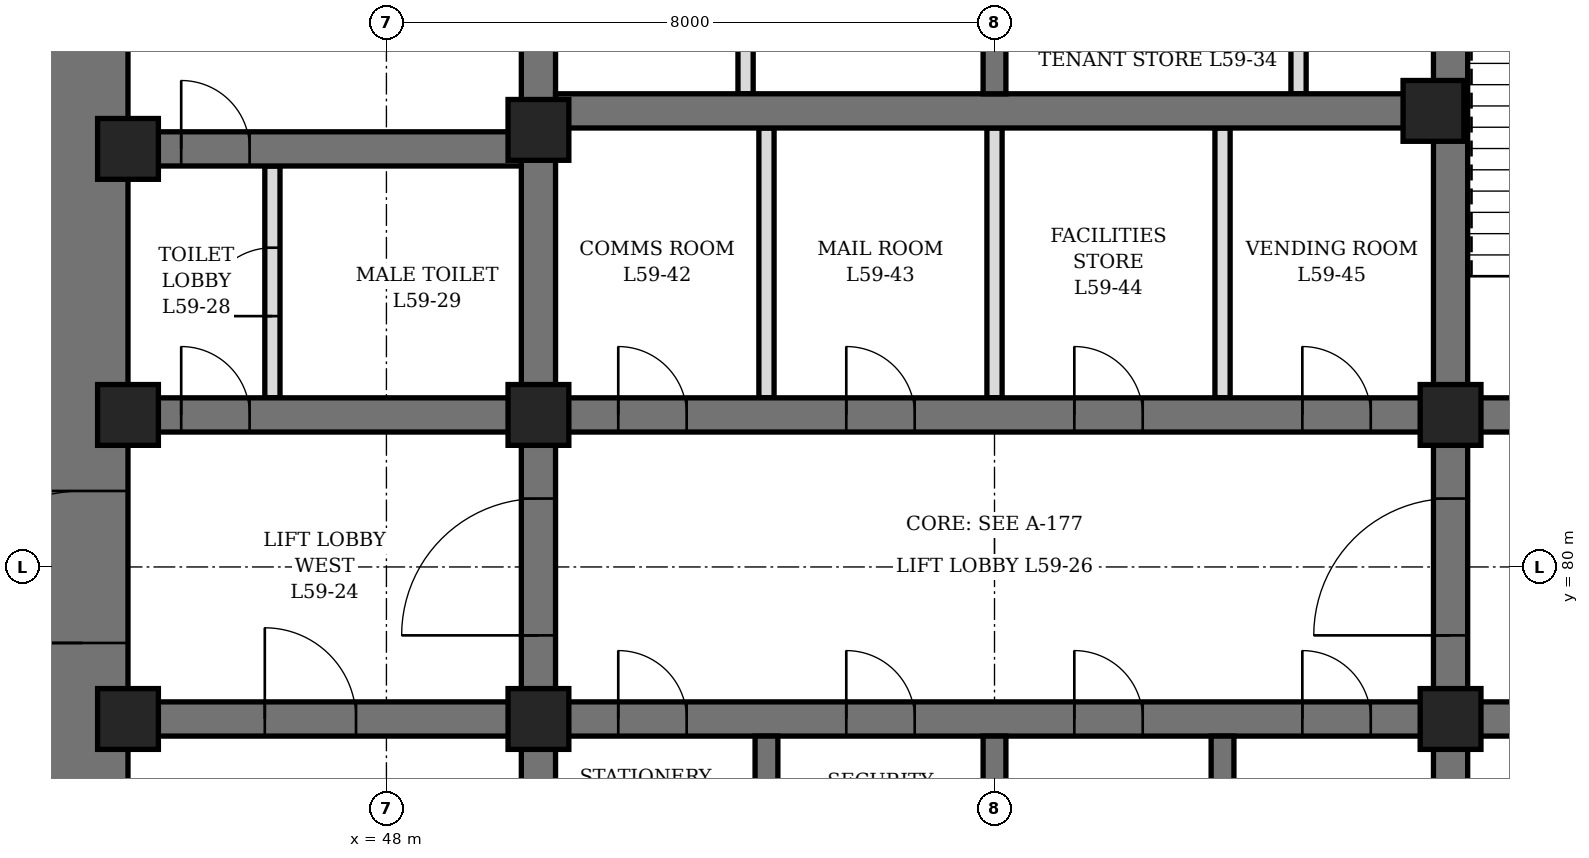
"""IFC4 building model, lengths in metres.
Left out: names, types, materials, properties, quantities, classifications, styles, units other than length and angle.
Written with IfcOpenShell. Run it as: python <this file> out.ifc"""

import sys

from ifc_helpers import new_model, si_unit, direction, frame, frame_2d, origin, origin_2d, place, context, subcontext, project, spatial, rectangle, hollow_rectangle, extrude, element, fill, save


model = new_model("IFC4")
c1 = context("Model", 3, precision=1e-05, world=origin(), true_north=direction((0.0, 1.0)))
c2 = subcontext(c1, "Body", "Model", "MODEL_VIEW")
j1 = project(units=[si_unit("LENGTHUNIT", "METRE"), si_unit("PLANEANGLEUNIT", "RADIAN")], contexts=[c1])
p1 = place(None, origin())
s1 = spatial("IfcSite", under=j1, at=p1, CompositionType="ELEMENT")
p2 = place(p1, origin())
s2 = spatial("IfcBuilding", under=s1, at=p2, CompositionType="ELEMENT")
p3 = place(p2, frame((0.0, 0.0, 262.9)))
s3 = spatial("IfcBuildingStorey", under=s2, at=p3, CompositionType="ELEMENT", Elevation=262.9)
p4 = place(p3, frame((44.0, 70.4, 0.0), z_axis=(0.0, 0.0, 1.0), x_axis=(0.0, 1.0, 0.0)))
e1 = element("IfcWall", 1, at=p4, inside=s3, PredefinedType="SHEAR", context=c2, shape_type="SweptSolid", body=[
    extrude(rectangle(XDim=19.2, YDim=1.2, at=frame_2d((9.6, 0.0))), origin(), (0.0, 0.0, 1.0), 4.2),
])
p5 = place(p4, frame((8.6, 0.0, 0.0)))
e2 = element("IfcOpeningElement", 2, at=p5, cuts=e1, PredefinedType="OPENING", context=c2, shape_type="SweptSolid", body=[
    extrude(rectangle(XDim=2.0, YDim=2.4, at=frame_2d((1.0, 1.2))), frame((0.0, 0.61, 0.0), z_axis=(0.0, -1.0, 0.0), x_axis=(1.0, 0.0, 0.0)), (0.0, 0.0, 1.0), 1.22),
])
p6 = place(p3, frame((50.0, 71.6, 0.0), z_axis=(0.0, 0.0, 1.0), x_axis=(0.0, 1.0, 0.0)))
e3 = element("IfcWall", 3, at=p6, inside=s3, PredefinedType="SHEAR", context=c2, shape_type="SweptSolid", body=[
    extrude(rectangle(XDim=16.8, YDim=0.45, at=frame_2d((8.4, 0.0))), origin(), (0.0, 0.0, 1.0), 4.2),
])
p7 = place(p6, frame((7.5, 0.0, 0.0)))
e4 = element("IfcOpeningElement", 4, at=p7, cuts=e3, PredefinedType="OPENING", context=c2, shape_type="SweptSolid", body=[
    extrude(rectangle(XDim=1.8, YDim=2.4, at=frame_2d((0.9, 1.2))), frame((0.0, 0.235, 0.0), z_axis=(0.0, -1.0, 0.0), x_axis=(1.0, 0.0, 0.0)), (0.0, 0.0, 1.0), 0.47),
])
p8 = place(p3, frame((62.0, 71.6, 0.0), z_axis=(0.0, 0.0, 1.0), x_axis=(0.0, 1.0, 0.0)))
e5 = element("IfcWall", 5, at=p8, inside=s3, PredefinedType="SHEAR", context=c2, shape_type="SweptSolid", body=[
    extrude(rectangle(XDim=16.8, YDim=0.45, at=frame_2d((8.4, 0.0))), origin(), (0.0, 0.0, 1.0), 4.2),
])
p9 = place(p8, frame((7.5, 0.0, 0.0)))
e6 = element("IfcOpeningElement", 6, at=p9, cuts=e5, PredefinedType="OPENING", context=c2, shape_type="SweptSolid", body=[
    extrude(rectangle(XDim=1.8, YDim=2.4, at=frame_2d((0.9, 1.2))), frame((0.0, 0.235, 0.0), z_axis=(0.0, -1.0, 0.0), x_axis=(1.0, 0.0, 0.0)), (0.0, 0.0, 1.0), 0.47),
])
p10 = place(p3, frame((44.6, 78.0, 0.0), z_axis=(0.0, 0.0, 1.0), x_axis=(1.0, 0.0, 0.0)))
e7 = element("IfcWall", 7, at=p10, inside=s3, PredefinedType="SHEAR", context=c2, shape_type="SweptSolid", body=[
    extrude(rectangle(XDim=5.175, YDim=0.45, at=frame_2d((2.587, 0.0))), origin(), (0.0, 0.0, 1.0), 4.2),
])
p11 = place(p10, frame((1.8, 0.0, 0.0)))
e8 = element("IfcOpeningElement", 8, at=p11, cuts=e7, PredefinedType="OPENING", context=c2, shape_type="SweptSolid", body=[
    extrude(rectangle(XDim=1.2, YDim=2.1, at=frame_2d((0.6, 1.05))), frame((0.0, 0.235, 0.0), z_axis=(0.0, -1.0, 0.0), x_axis=(1.0, 0.0, 0.0)), (0.0, 0.0, 1.0), 0.47),
])
p12 = place(p3, frame((44.6, 82.0, 0.0), z_axis=(0.0, 0.0, 1.0), x_axis=(1.0, 0.0, 0.0)))
e9 = element("IfcWall", 9, at=p12, inside=s3, PredefinedType="SHEAR", context=c2, shape_type="SweptSolid", body=[
    extrude(rectangle(XDim=5.175, YDim=0.45, at=frame_2d((2.587, 0.0))), origin(), (0.0, 0.0, 1.0), 4.2),
])
p13 = place(p12, frame((0.7, 0.0, 0.0)))
e10 = element("IfcOpeningElement", 10, at=p13, cuts=e9, PredefinedType="OPENING", context=c2, shape_type="SweptSolid", body=[
    extrude(rectangle(XDim=0.9, YDim=2.1, at=frame_2d((0.45, 1.05))), frame((0.0, 0.235, 0.0), z_axis=(0.0, -1.0, 0.0), x_axis=(1.0, 0.0, 0.0)), (0.0, 0.0, 1.0), 0.47),
])
p14 = place(p3, frame((44.6, 85.5, 0.0), z_axis=(0.0, 0.0, 1.0), x_axis=(1.0, 0.0, 0.0)))
e11 = element("IfcWall", 11, at=p14, inside=s3, PredefinedType="SHEAR", context=c2, shape_type="SweptSolid", body=[
    extrude(rectangle(XDim=5.175, YDim=0.45, at=frame_2d((2.587, 0.0))), origin(), (0.0, 0.0, 1.0), 4.2),
])
p15 = place(p14, frame((0.7, 0.0, 0.0)))
e12 = element("IfcOpeningElement", 12, at=p15, cuts=e11, PredefinedType="OPENING", context=c2, shape_type="SweptSolid", body=[
    extrude(rectangle(XDim=0.9, YDim=2.1, at=frame_2d((0.45, 1.05))), frame((0.0, 0.235, 0.0), z_axis=(0.0, -1.0, 0.0), x_axis=(1.0, 0.0, 0.0)), (0.0, 0.0, 1.0), 0.47),
])
p16 = place(p3, frame((62.225, 78.0, 0.0), z_axis=(0.0, 0.0, 1.0), x_axis=(1.0, 0.0, 0.0)))
e13 = element("IfcWall", 13, at=p16, inside=s3, PredefinedType="SHEAR", context=c2, shape_type="SweptSolid", body=[
    extrude(rectangle(XDim=5.175, YDim=0.45, at=frame_2d((2.587, 0.0))), origin(), (0.0, 0.0, 1.0), 4.2),
])
p17 = place(p16, frame((2.175, 0.0, 0.0)))
e14 = element("IfcOpeningElement", 14, at=p17, cuts=e13, PredefinedType="OPENING", context=c2, shape_type="SweptSolid", body=[
    extrude(rectangle(XDim=1.2, YDim=2.1, at=frame_2d((0.6, 1.05))), frame((0.0, 0.235, 0.0), z_axis=(0.0, -1.0, 0.0), x_axis=(1.0, 0.0, 0.0)), (0.0, 0.0, 1.0), 0.47),
])
p18 = place(p3, frame((62.225, 82.0, 0.0), z_axis=(0.0, 0.0, 1.0), x_axis=(1.0, 0.0, 0.0)))
e15 = element("IfcWall", 15, at=p18, inside=s3, PredefinedType="SHEAR", context=c2, shape_type="SweptSolid", body=[
    extrude(rectangle(XDim=5.175, YDim=0.45, at=frame_2d((2.587, 0.0))), origin(), (0.0, 0.0, 1.0), 4.2),
])
p19 = place(p18, frame((2.175, 0.0, 0.0)))
e16 = element("IfcOpeningElement", 16, at=p19, cuts=e15, PredefinedType="OPENING", context=c2, shape_type="SweptSolid", body=[
    extrude(rectangle(XDim=1.2, YDim=2.1, at=frame_2d((0.6, 1.05))), frame((0.0, 0.235, 0.0), z_axis=(0.0, -1.0, 0.0), x_axis=(1.0, 0.0, 0.0)), (0.0, 0.0, 1.0), 0.47),
])
p20 = place(p3, frame((50.225, 78.0, 0.0), z_axis=(0.0, 0.0, 1.0), x_axis=(1.0, 0.0, 0.0)))
e17 = element("IfcWall", 17, at=p20, inside=s3, PredefinedType="SHEAR", context=c2, shape_type="SweptSolid", body=[
    extrude(rectangle(XDim=11.55, YDim=0.45, at=frame_2d((5.775, 0.0))), origin(), (0.0, 0.0, 1.0), 4.2),
])
p21 = place(p20, frame((0.825, 0.0, 0.0)))
e18 = element("IfcOpeningElement", 18, at=p21, cuts=e17, PredefinedType="OPENING", context=c2, shape_type="SweptSolid", body=[
    extrude(rectangle(XDim=0.9, YDim=2.1, at=frame_2d((0.45, 1.05))), frame((0.0, 0.235, 0.0), z_axis=(0.0, -1.0, 0.0), x_axis=(1.0, 0.0, 0.0)), (0.0, 0.0, 1.0), 0.47),
])
p22 = place(p20, frame((3.825, 0.0, 0.0)))
e19 = element("IfcOpeningElement", 19, at=p22, cuts=e17, PredefinedType="OPENING", context=c2, shape_type="SweptSolid", body=[
    extrude(rectangle(XDim=0.9, YDim=2.1, at=frame_2d((0.45, 1.05))), frame((0.0, 0.235, 0.0), z_axis=(0.0, -1.0, 0.0), x_axis=(1.0, 0.0, 0.0)), (0.0, 0.0, 1.0), 0.47),
])
p23 = place(p20, frame((6.825, 0.0, 0.0)))
e20 = element("IfcOpeningElement", 20, at=p23, cuts=e17, PredefinedType="OPENING", context=c2, shape_type="SweptSolid", body=[
    extrude(rectangle(XDim=0.9, YDim=2.1, at=frame_2d((0.45, 1.05))), frame((0.0, 0.235, 0.0), z_axis=(0.0, -1.0, 0.0), x_axis=(1.0, 0.0, 0.0)), (0.0, 0.0, 1.0), 0.47),
])
p24 = place(p20, frame((9.825, 0.0, 0.0)))
e21 = element("IfcOpeningElement", 21, at=p24, cuts=e17, PredefinedType="OPENING", context=c2, shape_type="SweptSolid", body=[
    extrude(rectangle(XDim=0.9, YDim=2.1, at=frame_2d((0.45, 1.05))), frame((0.0, 0.235, 0.0), z_axis=(0.0, -1.0, 0.0), x_axis=(1.0, 0.0, 0.0)), (0.0, 0.0, 1.0), 0.47),
])
p25 = place(p3, frame((50.225, 82.0, 0.0), z_axis=(0.0, 0.0, 1.0), x_axis=(1.0, 0.0, 0.0)))
e22 = element("IfcWall", 22, at=p25, inside=s3, PredefinedType="SHEAR", context=c2, shape_type="SweptSolid", body=[
    extrude(rectangle(XDim=11.55, YDim=0.45, at=frame_2d((5.775, 0.0))), origin(), (0.0, 0.0, 1.0), 4.2),
])
p26 = place(p25, frame((0.825, 0.0, 0.0)))
e23 = element("IfcOpeningElement", 23, at=p26, cuts=e22, PredefinedType="OPENING", context=c2, shape_type="SweptSolid", body=[
    extrude(rectangle(XDim=0.9, YDim=2.1, at=frame_2d((0.45, 1.05))), frame((0.0, 0.235, 0.0), z_axis=(0.0, -1.0, 0.0), x_axis=(1.0, 0.0, 0.0)), (0.0, 0.0, 1.0), 0.47),
])
p27 = place(p25, frame((3.825, 0.0, 0.0)))
e24 = element("IfcOpeningElement", 24, at=p27, cuts=e22, PredefinedType="OPENING", context=c2, shape_type="SweptSolid", body=[
    extrude(rectangle(XDim=0.9, YDim=2.1, at=frame_2d((0.45, 1.05))), frame((0.0, 0.235, 0.0), z_axis=(0.0, -1.0, 0.0), x_axis=(1.0, 0.0, 0.0)), (0.0, 0.0, 1.0), 0.47),
])
p28 = place(p25, frame((6.825, 0.0, 0.0)))
e25 = element("IfcOpeningElement", 25, at=p28, cuts=e22, PredefinedType="OPENING", context=c2, shape_type="SweptSolid", body=[
    extrude(rectangle(XDim=0.9, YDim=2.1, at=frame_2d((0.45, 1.05))), frame((0.0, 0.235, 0.0), z_axis=(0.0, -1.0, 0.0), x_axis=(1.0, 0.0, 0.0)), (0.0, 0.0, 1.0), 0.47),
])
p29 = place(p25, frame((9.825, 0.0, 0.0)))
e26 = element("IfcOpeningElement", 26, at=p29, cuts=e22, PredefinedType="OPENING", context=c2, shape_type="SweptSolid", body=[
    extrude(rectangle(XDim=0.9, YDim=2.1, at=frame_2d((0.45, 1.05))), frame((0.0, 0.235, 0.0), z_axis=(0.0, -1.0, 0.0), x_axis=(1.0, 0.0, 0.0)), (0.0, 0.0, 1.0), 0.47),
])
p30 = place(p3, frame((50.225, 86.0, 0.0), z_axis=(0.0, 0.0, 1.0), x_axis=(1.0, 0.0, 0.0)))
e27 = element("IfcWall", 27, at=p30, inside=s3, PredefinedType="SHEAR", context=c2, shape_type="SweptSolid", body=[
    extrude(rectangle(XDim=11.55, YDim=0.45, at=frame_2d((5.775, 0.0))), origin(), (0.0, 0.0, 1.0), 4.2),
])
for number, where, z_axis, x_axis in (
    (28, (53.0, 74.15, 0.0), (0.0, 0.0, 1.0), (0.0, 1.0, 0.0)),
    (29, (56.0, 74.15, 0.0), (0.0, 0.0, 1.0), (0.0, 1.0, 0.0)),
    (30, (59.0, 74.15, 0.0), (0.0, 0.0, 1.0), (0.0, 1.0, 0.0)),
):
    element("IfcWall", number, at=place(p3, frame(where, z_axis=z_axis, x_axis=x_axis)), inside=s3, PredefinedType="SHEAR", context=c2, shape_type="SweptSolid", body=[
        extrude(rectangle(XDim=3.625, YDim=0.3, at=frame_2d((1.812, 0.0))), origin(), (0.0, 0.0, 1.0), 4.2),
    ])
p31 = place(p3, frame((56.0, 86.225, 0.0), z_axis=(0.0, 0.0, 1.0), x_axis=(0.0, 1.0, 0.0)))
e31 = element("IfcWall", 31, at=p31, inside=s3, PredefinedType="SHEAR", context=c2, shape_type="SweptSolid", body=[
    extrude(rectangle(XDim=2.175, YDim=0.3, at=frame_2d((1.087, 0.0))), origin(), (0.0, 0.0, 1.0), 4.2),
])
for number, where, z_axis, x_axis in (
    (32, (44.6, 78.0, 0.0), (0.0, 0.0, 1.0), (1.0, 0.0, 0.0)),
    (33, (44.6, 82.0, 0.0), (0.0, 0.0, 1.0), (1.0, 0.0, 0.0)),
    (34, (44.6, 85.5, 0.0), (0.0, 0.0, 1.0), (1.0, 0.0, 0.0)),
    (35, (50.0, 78.0, 0.0), (0.0, 0.0, 1.0), (1.0, 0.0, 0.0)),
    (36, (50.0, 82.0, 0.0), (0.0, 0.0, 1.0), (1.0, 0.0, 0.0)),
    (37, (50.0, 85.75, 0.0), (0.0, 0.0, 1.0), (1.0, 0.0, 0.0)),
    (38, (61.775, 86.0, 0.0), (0.0, 0.0, 1.0), (1.0, 0.0, 0.0)),
    (39, (62.0, 78.0, 0.0), (0.0, 0.0, 1.0), (1.0, 0.0, 0.0)),
    (40, (62.0, 82.0, 0.0), (0.0, 0.0, 1.0), (1.0, 0.0, 0.0)),
):
    element("IfcColumn", number, at=place(p3, frame(where, z_axis=z_axis, x_axis=x_axis)), inside=s3, PredefinedType="COLUMN", context=c2, shape_type="SweptSolid", body=[
        extrude(hollow_rectangle(XDim=0.8, YDim=0.8, WallThickness=0.1, at=origin_2d()), origin(), (0.0, 0.0, 1.0), 4.2),
    ])
p32 = place(p3, frame((46.5, 82.225, 0.0), z_axis=(0.0, 0.0, 1.0), x_axis=(0.0, 1.0, 0.0)))
e41 = element("IfcWall", 41, at=p32, inside=s3, PredefinedType="PARTITIONING", context=c2, shape_type="SweptSolid", body=[
    extrude(rectangle(XDim=3.05, YDim=0.2, at=frame_2d((1.525, 0.0))), origin(), (0.0, 0.0, 1.0), 4.04),
])
p33 = place(p32, frame((1.075, 0.0, 0.0)))
e42 = element("IfcOpeningElement", 42, at=p33, cuts=e41, PredefinedType="OPENING", context=c2, shape_type="SweptSolid", body=[
    extrude(rectangle(XDim=0.9, YDim=2.1, at=frame_2d((0.45, 1.05))), frame((0.0, 0.11, 0.0), z_axis=(0.0, -1.0, 0.0), x_axis=(1.0, 0.0, 0.0)), (0.0, 0.0, 1.0), 0.22),
])
p34 = place(p3, frame((52.725, 86.225, 0.0), z_axis=(0.0, 0.0, 1.0), x_axis=(0.0, 1.0, 0.0)))
e43 = element("IfcWall", 43, at=p34, inside=s3, PredefinedType="PARTITIONING", context=c2, shape_type="SweptSolid", body=[
    extrude(rectangle(XDim=2.175, YDim=0.2, at=frame_2d((1.087, 0.0))), origin(), (0.0, 0.0, 1.0), 4.04),
])
p35 = place(p3, frame((60.0, 86.225, 0.0), z_axis=(0.0, 0.0, 1.0), x_axis=(0.0, 1.0, 0.0)))
e44 = element("IfcWall", 44, at=p35, inside=s3, PredefinedType="PARTITIONING", context=c2, shape_type="SweptSolid", body=[
    extrude(rectangle(XDim=2.175, YDim=0.2, at=frame_2d((1.087, 0.0))), origin(), (0.0, 0.0, 1.0), 4.04),
])
p36 = place(p35, frame((0.637, 0.0, 0.0)))
e45 = element("IfcOpeningElement", 45, at=p36, cuts=e44, PredefinedType="OPENING", context=c2, shape_type="SweptSolid", body=[
    extrude(rectangle(XDim=0.9, YDim=2.1, at=frame_2d((0.45, 1.05))), frame((0.0, 0.11, 0.0), z_axis=(0.0, -1.0, 0.0), x_axis=(1.0, 0.0, 0.0)), (0.0, 0.0, 1.0), 0.22),
])
p37 = place(p3, frame((53.0, 82.225, 0.0), z_axis=(0.0, 0.0, 1.0), x_axis=(0.0, 1.0, 0.0)))
e46 = element("IfcWall", 46, at=p37, inside=s3, PredefinedType="PARTITIONING", context=c2, shape_type="SweptSolid", body=[
    extrude(rectangle(XDim=3.55, YDim=0.2, at=frame_2d((1.775, 0.0))), origin(), (0.0, 0.0, 1.0), 4.04),
])
p38 = place(p3, frame((56.0, 82.225, 0.0), z_axis=(0.0, 0.0, 1.0), x_axis=(0.0, 1.0, 0.0)))
e47 = element("IfcWall", 47, at=p38, inside=s3, PredefinedType="PARTITIONING", context=c2, shape_type="SweptSolid", body=[
    extrude(rectangle(XDim=3.55, YDim=0.2, at=frame_2d((1.775, 0.0))), origin(), (0.0, 0.0, 1.0), 3.14),
])
p39 = place(p3, frame((59.0, 82.225, 0.0), z_axis=(0.0, 0.0, 1.0), x_axis=(0.0, 1.0, 0.0)))
e48 = element("IfcWall", 48, at=p39, inside=s3, PredefinedType="PARTITIONING", context=c2, shape_type="SweptSolid", body=[
    extrude(rectangle(XDim=3.55, YDim=0.2, at=frame_2d((1.775, 0.0))), origin(), (0.0, 0.0, 1.0), 4.04),
])
p40 = place(p13, origin())
e49 = element("IfcDoor", 49, at=p40, inside=s3, OperationType="SINGLE_SWING_LEFT", PredefinedType="DOOR", context=c2, shape_type="SweptSolid", body=[
    extrude(rectangle(XDim=0.9, YDim=2.1, at=frame_2d((0.45, 1.05))), frame((0.0, 0.225, 0.0), z_axis=(0.0, -1.0, 0.0), x_axis=(1.0, 0.0, 0.0)), (0.0, 0.0, 1.0), 0.449),
])
fill(e10, e49)
p41 = place(p33, origin())
e50 = element("IfcDoor", 50, at=p41, inside=s3, OperationType="SINGLE_SWING_RIGHT", PredefinedType="DOOR", context=c2, shape_type="SweptSolid", body=[
    extrude(rectangle(XDim=0.9, YDim=2.1, at=frame_2d((0.45, 1.05))), frame((0.0, 0.1, 0.0), z_axis=(0.0, -1.0, 0.0), x_axis=(1.0, 0.0, 0.0)), (0.0, 0.0, 1.0), 0.199),
])
fill(e42, e50)
p42 = place(p15, origin())
e51 = element("IfcDoor", 51, at=p42, inside=s3, OperationType="SINGLE_SWING_RIGHT", PredefinedType="DOOR", context=c2, shape_type="SweptSolid", body=[
    extrude(rectangle(XDim=0.9, YDim=2.1, at=frame_2d((0.45, 1.05))), frame((0.0, 0.225, 0.0), z_axis=(0.0, -1.0, 0.0), x_axis=(1.0, 0.0, 0.0)), (0.0, 0.0, 1.0), 0.449),
])
fill(e12, e51)
p43 = place(p21, origin())
e52 = element("IfcDoor", 52, at=p43, inside=s3, OperationType="SINGLE_SWING_LEFT", PredefinedType="DOOR", context=c2, shape_type="SweptSolid", body=[
    extrude(rectangle(XDim=0.9, YDim=2.1, at=frame_2d((0.45, 1.05))), frame((0.0, 0.225, 0.0), z_axis=(0.0, -1.0, 0.0), x_axis=(1.0, 0.0, 0.0)), (0.0, 0.0, 1.0), 0.449),
])
fill(e18, e52)
p44 = place(p22, origin())
e53 = element("IfcDoor", 53, at=p44, inside=s3, OperationType="SINGLE_SWING_LEFT", PredefinedType="DOOR", context=c2, shape_type="SweptSolid", body=[
    extrude(rectangle(XDim=0.9, YDim=2.1, at=frame_2d((0.45, 1.05))), frame((0.0, 0.225, 0.0), z_axis=(0.0, -1.0, 0.0), x_axis=(1.0, 0.0, 0.0)), (0.0, 0.0, 1.0), 0.449),
])
fill(e19, e53)
p45 = place(p23, origin())
e54 = element("IfcDoor", 54, at=p45, inside=s3, OperationType="SINGLE_SWING_LEFT", PredefinedType="DOOR", context=c2, shape_type="SweptSolid", body=[
    extrude(rectangle(XDim=0.9, YDim=2.1, at=frame_2d((0.45, 1.05))), frame((0.0, 0.225, 0.0), z_axis=(0.0, -1.0, 0.0), x_axis=(1.0, 0.0, 0.0)), (0.0, 0.0, 1.0), 0.449),
])
fill(e20, e54)
p46 = place(p24, origin())
e55 = element("IfcDoor", 55, at=p46, inside=s3, OperationType="SINGLE_SWING_LEFT", PredefinedType="DOOR", context=c2, shape_type="SweptSolid", body=[
    extrude(rectangle(XDim=0.9, YDim=2.1, at=frame_2d((0.45, 1.05))), frame((0.0, 0.225, 0.0), z_axis=(0.0, -1.0, 0.0), x_axis=(1.0, 0.0, 0.0)), (0.0, 0.0, 1.0), 0.449),
])
fill(e21, e55)
p47 = place(p26, origin())
e56 = element("IfcDoor", 56, at=p47, inside=s3, OperationType="SINGLE_SWING_LEFT", PredefinedType="DOOR", context=c2, shape_type="SweptSolid", body=[
    extrude(rectangle(XDim=0.9, YDim=2.1, at=frame_2d((0.45, 1.05))), frame((0.0, 0.225, 0.0), z_axis=(0.0, -1.0, 0.0), x_axis=(1.0, 0.0, 0.0)), (0.0, 0.0, 1.0), 0.449),
])
fill(e23, e56)
p48 = place(p27, origin())
e57 = element("IfcDoor", 57, at=p48, inside=s3, OperationType="SINGLE_SWING_LEFT", PredefinedType="DOOR", context=c2, shape_type="SweptSolid", body=[
    extrude(rectangle(XDim=0.9, YDim=2.1, at=frame_2d((0.45, 1.05))), frame((0.0, 0.225, 0.0), z_axis=(0.0, -1.0, 0.0), x_axis=(1.0, 0.0, 0.0)), (0.0, 0.0, 1.0), 0.449),
])
fill(e24, e57)
p49 = place(p28, origin())
e58 = element("IfcDoor", 58, at=p49, inside=s3, OperationType="SINGLE_SWING_LEFT", PredefinedType="DOOR", context=c2, shape_type="SweptSolid", body=[
    extrude(rectangle(XDim=0.9, YDim=2.1, at=frame_2d((0.45, 1.05))), frame((0.0, 0.225, 0.0), z_axis=(0.0, -1.0, 0.0), x_axis=(1.0, 0.0, 0.0)), (0.0, 0.0, 1.0), 0.449),
])
fill(e25, e58)
p50 = place(p29, origin())
e59 = element("IfcDoor", 59, at=p50, inside=s3, OperationType="SINGLE_SWING_LEFT", PredefinedType="DOOR", context=c2, shape_type="SweptSolid", body=[
    extrude(rectangle(XDim=0.9, YDim=2.1, at=frame_2d((0.45, 1.05))), frame((0.0, 0.225, 0.0), z_axis=(0.0, -1.0, 0.0), x_axis=(1.0, 0.0, 0.0)), (0.0, 0.0, 1.0), 0.449),
])
fill(e26, e59)
p51 = place(p11, origin())
e60 = element("IfcDoor", 60, at=p51, inside=s3, OperationType="SINGLE_SWING_LEFT", PredefinedType="DOOR", context=c2, shape_type="SweptSolid", body=[
    extrude(rectangle(XDim=1.2, YDim=2.1, at=frame_2d((0.6, 1.05))), frame((0.0, 0.225, 0.0), z_axis=(0.0, -1.0, 0.0), x_axis=(1.0, 0.0, 0.0)), (0.0, 0.0, 1.0), 0.449),
])
fill(e8, e60)
p52 = place(p5, origin())
e61 = element("IfcDoor", 61, at=p52, inside=s3, OperationType="DOUBLE_DOOR_SINGLE_SWING", PredefinedType="DOOR", context=c2, shape_type="SweptSolid", body=[
    extrude(rectangle(XDim=2.0, YDim=2.4, at=frame_2d((1.0, 1.2))), frame((0.0, 0.35, 0.0), z_axis=(0.0, -1.0, 0.0), x_axis=(1.0, 0.0, 0.0)), (0.0, 0.0, 1.0), 0.7),
])
fill(e2, e61)
p53 = place(p7, origin())
e62 = element("IfcDoor", 62, at=p53, inside=s3, OperationType="DOUBLE_DOOR_SINGLE_SWING", PredefinedType="DOOR", context=c2, shape_type="SweptSolid", body=[
    extrude(rectangle(XDim=1.8, YDim=2.4, at=frame_2d((0.9, 1.2))), frame((0.0, 0.225, 0.0), z_axis=(0.0, -1.0, 0.0), x_axis=(1.0, 0.0, 0.0)), (0.0, 0.0, 1.0), 0.449),
])
fill(e4, e62)
p54 = place(p9, origin())
e63 = element("IfcDoor", 63, at=p54, inside=s3, OperationType="DOUBLE_DOOR_SINGLE_SWING", PredefinedType="DOOR", context=c2, shape_type="SweptSolid", body=[
    extrude(rectangle(XDim=1.8, YDim=2.4, at=frame_2d((0.9, 1.2))), frame((0.0, 0.225, 0.0), z_axis=(0.0, -1.0, 0.0), x_axis=(1.0, 0.0, 0.0)), (0.0, 0.0, 1.0), 0.449),
])
fill(e6, e63)
save(model, sys.argv[1])
